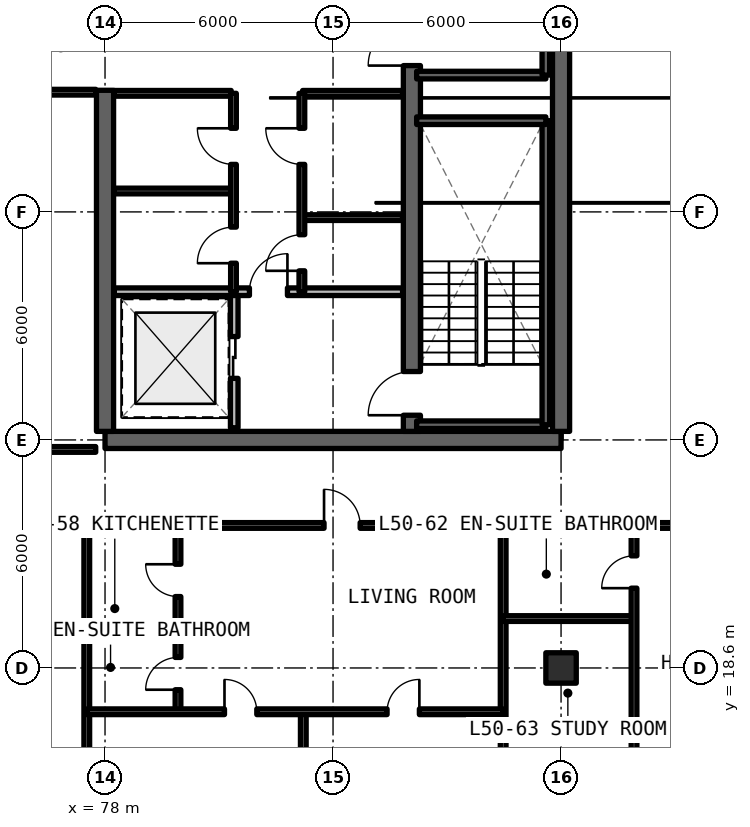
"""IFC4 building model, lengths in metres.
Left out: names, types, materials, properties, quantities, classifications, styles, units other than length and angle.
Written with IfcOpenShell. Run it as: python <this file> out.ifc"""

import sys

from ifc_helpers import new_model, si_unit, direction, frame, frame_2d, origin, origin_2d, place, context, subcontext, project, spatial, rectangle, extrude, element, fill, save


model = new_model("IFC4")
c1 = context("Model", 3, precision=1e-05, world=origin(), true_north=direction((0.0, 1.0)))
c2 = subcontext(c1, "Body", "Model", "MODEL_VIEW")
j1 = project(units=[si_unit("LENGTHUNIT", "METRE"), si_unit("PLANEANGLEUNIT", "RADIAN")], contexts=[c1])
p1 = place(None, origin())
s1 = spatial("IfcSite", under=j1, at=p1, CompositionType="ELEMENT")
p2 = place(p1, origin())
s2 = spatial("IfcBuilding", under=s1, at=p2, CompositionType="ELEMENT")
p3 = place(p2, frame((0.0, 0.0, 181.83)))
s3 = spatial("IfcBuildingStorey", under=s2, at=p3, CompositionType="ELEMENT", Elevation=181.83)
p4 = place(p3, frame((78.0, 24.6, 0.0), z_axis=(0.0, 0.0, 1.0), x_axis=(1.0, 0.0, 0.0)))
e1 = element("IfcWall", 1, at=p4, inside=s3, PredefinedType="SHEAR", context=c2, shape_type="SweptSolid", body=[
    extrude(rectangle(XDim=12.0, YDim=0.45, at=frame_2d((6.0, 0.0))), origin(), (0.0, 0.0, 1.0), 3.3),
])
p5 = place(p3, frame((90.0, 24.825, 0.0), z_axis=(0.0, 0.0, 1.0), x_axis=(0.0, 1.0, 0.0)))
e2 = element("IfcWall", 2, at=p5, inside=s3, PredefinedType="SHEAR", context=c2, shape_type="SweptSolid", body=[
    extrude(rectangle(XDim=17.55, YDim=0.45, at=frame_2d((8.775, 0.0))), origin(), (0.0, 0.0, 1.0), 3.3),
])
p6 = place(p3, frame((78.0, 24.825, 0.0), z_axis=(0.0, 0.0, 1.0), x_axis=(0.0, 1.0, 0.0)))
e3 = element("IfcWall", 3, at=p6, inside=s3, PredefinedType="SHEAR", context=c2, shape_type="SweptSolid", body=[
    extrude(rectangle(XDim=8.975, YDim=0.45, at=frame_2d((4.488, 0.0))), origin(), (0.0, 0.0, 1.0), 3.3),
])
p7 = place(p3, frame((86.075, 24.825, 0.0), z_axis=(0.0, 0.0, 1.0), x_axis=(0.0, 1.0, 0.0)))
e4 = element("IfcWall", 4, at=p7, inside=s3, PredefinedType="SHEAR", context=c2, shape_type="SweptSolid", body=[
    extrude(rectangle(XDim=17.55, YDim=0.45, at=frame_2d((8.775, 0.0))), origin(), (0.0, 0.0, 1.0), 3.3),
])
p8 = place(p7, frame((0.425, 0.0, 0.0)))
e5 = element("IfcOpeningElement", 5, at=p8, cuts=e4, PredefinedType="OPENING", context=c2, shape_type="SweptSolid", body=[
    extrude(rectangle(XDim=1.15, YDim=2.15, at=frame_2d((0.575, 1.075))), frame((0.0, 0.235, 0.0), z_axis=(0.0, -1.0, 0.0), x_axis=(1.0, 0.0, 0.0)), (0.0, 0.0, 1.0), 0.47),
])
p9 = place(p7, frame((9.625, 0.0, 0.0)))
e6 = element("IfcOpeningElement", 6, at=p9, cuts=e4, PredefinedType="OPENING", context=c2, shape_type="SweptSolid", body=[
    extrude(rectangle(XDim=1.15, YDim=2.15, at=frame_2d((0.575, 1.075))), frame((0.0, 0.235, 0.0), z_axis=(0.0, -1.0, 0.0), x_axis=(1.0, 0.0, 0.0)), (0.0, 0.0, 1.0), 0.47),
])
p10 = place(p3, frame((90.0, 18.6, 0.0), z_axis=(0.0, 0.0, 1.0), x_axis=(1.0, 0.0, 0.0)))
e7 = element("IfcColumn", 7, at=p10, inside=s3, PredefinedType="COLUMN", context=c2, shape_type="SweptSolid", body=[
    extrude(rectangle(XDim=0.8, YDim=0.8, at=origin_2d()), origin(), (0.0, 0.0, 1.0), 3.3),
])
p11 = place(p3, frame((81.4, 24.92, 0.0), z_axis=(0.0, 0.0, 1.0), x_axis=(0.0, 1.0, 0.0)))
e8 = element("IfcWall", 8, at=p11, inside=s3, PredefinedType="SOLIDWALL", context=c2, shape_type="SweptSolid", body=[
    extrude(rectangle(XDim=3.58, YDim=0.2, at=frame_2d((1.79, 0.0))), origin(), (0.0, 0.0, 1.0), 2.35),
])
p12 = place(p11, frame((1.3, 0.0, 0.0)))
e9 = element("IfcOpeningElement", 9, at=p12, cuts=e8, PredefinedType="OPENING", context=c2, shape_type="SweptSolid", body=[
    extrude(rectangle(XDim=1.1, YDim=2.2, at=frame_2d((0.55, 1.1))), frame((0.0, 0.11, 0.0), z_axis=(0.0, -1.0, 0.0), x_axis=(1.0, 0.0, 0.0)), (0.0, 0.0, 1.0), 0.22),
])
p13 = place(p3, frame((78.245, 28.5, 0.0), z_axis=(0.0, 0.0, 1.0), x_axis=(1.0, 0.0, 0.0)))
e10 = element("IfcWall", 10, at=p13, inside=s3, PredefinedType="SOLIDWALL", context=c2, shape_type="SweptSolid", body=[
    extrude(rectangle(XDim=7.585, YDim=0.2, at=frame_2d((3.792, 0.0))), origin(), (0.0, 0.0, 1.0), 2.35),
])
p14 = place(p13, frame((3.555, 0.0, 0.0)))
e11 = element("IfcOpeningElement", 11, at=p14, cuts=e10, PredefinedType="OPENING", context=c2, shape_type="SweptSolid", body=[
    extrude(rectangle(XDim=1.0, YDim=2.15, at=frame_2d((0.5, 1.075))), frame((0.0, 0.11, 0.0), z_axis=(0.0, -1.0, 0.0), x_axis=(1.0, 0.0, 0.0)), (0.0, 0.0, 1.0), 0.22),
])
for number, where, z_axis, x_axis in (
    (12, (83.2, 30.45, 0.0), (0.0, 0.0, 1.0), (1.0, 0.0, 0.0)),
    (13, (83.2, 33.72, 0.0), (0.0, 0.0, 1.0), (1.0, 0.0, 0.0)),
):
    element("IfcWall", number, at=place(p3, frame(where, z_axis=z_axis, x_axis=x_axis)), inside=s3, PredefinedType="SOLIDWALL", context=c2, shape_type="SweptSolid", body=[
        extrude(rectangle(XDim=2.63, YDim=0.15, at=frame_2d((1.315, 0.0))), origin(), (0.0, 0.0, 1.0), 2.35),
    ])
p15 = place(p3, frame((83.18, 28.5, 0.0), z_axis=(0.0, 0.0, 1.0), x_axis=(0.0, 1.0, 0.0)))
e14 = element("IfcWall", 14, at=p15, inside=s3, PredefinedType="SOLIDWALL", context=c2, shape_type="SweptSolid", body=[
    extrude(rectangle(XDim=5.22, YDim=0.15, at=frame_2d((2.61, 0.0))), origin(), (0.0, 0.0, 1.0), 2.35),
])
p16 = place(p15, frame((0.55, 0.0, 0.0)))
e15 = element("IfcOpeningElement", 15, at=p16, cuts=e14, PredefinedType="OPENING", context=c2, shape_type="SweptSolid", body=[
    extrude(rectangle(XDim=0.95, YDim=2.15, at=frame_2d((0.475, 1.075))), frame((0.0, 0.085, 0.0), z_axis=(0.0, -1.0, 0.0), x_axis=(1.0, 0.0, 0.0)), (0.0, 0.0, 1.0), 0.17),
])
p17 = place(p15, frame((3.35, 0.0, 0.0)))
e16 = element("IfcOpeningElement", 16, at=p17, cuts=e14, PredefinedType="OPENING", context=c2, shape_type="SweptSolid", body=[
    extrude(rectangle(XDim=0.95, YDim=2.15, at=frame_2d((0.475, 1.075))), frame((0.0, 0.085, 0.0), z_axis=(0.0, -1.0, 0.0), x_axis=(1.0, 0.0, 0.0)), (0.0, 0.0, 1.0), 0.17),
])
for number, where, z_axis, x_axis in (
    (17, (78.245, 31.15, 0.0), (0.0, 0.0, 1.0), (1.0, 0.0, 0.0)),
    (18, (78.245, 33.72, 0.0), (0.0, 0.0, 1.0), (1.0, 0.0, 0.0)),
):
    element("IfcWall", number, at=place(p3, frame(where, z_axis=z_axis, x_axis=x_axis)), inside=s3, PredefinedType="SOLIDWALL", context=c2, shape_type="SweptSolid", body=[
        extrude(rectangle(XDim=3.075, YDim=0.15, at=frame_2d((1.538, 0.0))), origin(), (0.0, 0.0, 1.0), 2.35),
    ])
p18 = place(p3, frame((81.38, 28.5, 0.0), z_axis=(0.0, 0.0, 1.0), x_axis=(0.0, 1.0, 0.0)))
e19 = element("IfcWall", 19, at=p18, inside=s3, PredefinedType="SOLIDWALL", context=c2, shape_type="SweptSolid", body=[
    extrude(rectangle(XDim=5.22, YDim=0.15, at=frame_2d((2.61, 0.0))), origin(), (0.0, 0.0, 1.0), 2.35),
])
p19 = place(p18, frame((0.75, 0.0, 0.0)))
e20 = element("IfcOpeningElement", 20, at=p19, cuts=e19, PredefinedType="OPENING", context=c2, shape_type="SweptSolid", body=[
    extrude(rectangle(XDim=0.95, YDim=2.15, at=frame_2d((0.475, 1.075))), frame((0.0, 0.085, 0.0), z_axis=(0.0, -1.0, 0.0), x_axis=(1.0, 0.0, 0.0)), (0.0, 0.0, 1.0), 0.17),
])
p20 = place(p18, frame((3.35, 0.0, 0.0)))
e21 = element("IfcOpeningElement", 21, at=p20, cuts=e19, PredefinedType="OPENING", context=c2, shape_type="SweptSolid", body=[
    extrude(rectangle(XDim=0.95, YDim=2.15, at=frame_2d((0.475, 1.075))), frame((0.0, 0.085, 0.0), z_axis=(0.0, -1.0, 0.0), x_axis=(1.0, 0.0, 0.0)), (0.0, 0.0, 1.0), 0.17),
])
p21 = place(p3, frame((69.85, 24.35, 0.0), z_axis=(0.0, 0.0, 1.0), x_axis=(1.0, 0.0, 0.0)))
e22 = element("IfcWall", 22, at=p21, inside=s3, PredefinedType="SOLIDWALL", context=c2, shape_type="SweptSolid", body=[
    extrude(rectangle(XDim=7.905, YDim=0.15, at=frame_2d((3.952, 0.0))), origin(), (0.0, 0.0, 1.0), 2.35),
])
p22 = place(p3, frame((69.85, 33.75, 0.0), z_axis=(0.0, 0.0, 1.0), x_axis=(1.0, 0.0, 0.0)))
e23 = element("IfcWall", 23, at=p22, inside=s3, PredefinedType="SOLIDWALL", context=c2, shape_type="SweptSolid", body=[
    extrude(rectangle(XDim=7.905, YDim=0.15, at=frame_2d((3.952, 0.0))), origin(), (0.0, 0.0, 1.0), 2.35),
])
p23 = place(p22, frame((3.478, 0.0, 0.0)))
e24 = element("IfcOpeningElement", 24, at=p23, cuts=e23, PredefinedType="OPENING", context=c2, shape_type="SweptSolid", body=[
    extrude(rectangle(XDim=0.95, YDim=2.15, at=frame_2d((0.475, 1.075))), frame((0.0, 0.085, 0.0), z_axis=(0.0, -1.0, 0.0), x_axis=(1.0, 0.0, 0.0)), (0.0, 0.0, 1.0), 0.17),
])
p24 = place(p3, frame((77.52, 12.27, 0.0), z_axis=(0.0, 0.0, 1.0), x_axis=(0.0, 1.0, 0.0)))
e25 = element("IfcWall", 25, at=p24, inside=s3, PredefinedType="SOLIDWALL", context=c2, shape_type="SweptSolid", body=[
    extrude(rectangle(XDim=10.08, YDim=0.15, at=frame_2d((5.04, 0.0))), origin(), (0.0, 0.0, 1.0), 2.35),
])
p25 = place(p3, frame((69.053, 22.35, 0.0), z_axis=(0.0, 0.0, 1.0), x_axis=(1.0, 0.0, 0.0)))
e26 = element("IfcWall", 26, at=p25, inside=s3, PredefinedType="SOLIDWALL", context=c2, shape_type="SweptSolid", body=[
    extrude(rectangle(XDim=8.467, YDim=0.15, at=frame_2d((4.233, 0.0))), origin(), (0.0, 0.0, 1.0), 2.35),
])
p26 = place(p25, frame((3.683, 0.0, 0.0)))
e27 = element("IfcOpeningElement", 27, at=p26, cuts=e26, PredefinedType="OPENING", context=c2, shape_type="SweptSolid", body=[
    extrude(rectangle(XDim=1.1, YDim=2.15, at=frame_2d((0.55, 1.075))), frame((0.0, 0.085, 0.0), z_axis=(0.0, -1.0, 0.0), x_axis=(1.0, 0.0, 0.0)), (0.0, 0.0, 1.0), 0.17),
])
p27 = place(p3, frame((88.477, 12.27, 0.0), z_axis=(0.0, 0.0, 1.0), x_axis=(0.0, 1.0, 0.0)))
e28 = element("IfcWall", 28, at=p27, inside=s3, PredefinedType="SOLIDWALL", context=c2, shape_type="SweptSolid", body=[
    extrude(rectangle(XDim=10.08, YDim=0.15, at=frame_2d((5.04, 0.0))), origin(), (0.0, 0.0, 1.0), 2.35),
])
p28 = place(p3, frame((77.52, 19.458, 0.0), z_axis=(0.0, 0.0, 1.0), x_axis=(1.0, 0.0, 0.0)))
e29 = element("IfcWall", 29, at=p28, inside=s3, PredefinedType="PARTITIONING", context=c2, shape_type="SweptSolid", body=[
    extrude(rectangle(XDim=2.4, YDim=0.15, at=frame_2d((1.2, 0.0))), origin(), (0.0, 0.0, 1.0), 2.35),
])
p29 = place(p3, frame((79.92, 17.448, 0.0), z_axis=(0.0, 0.0, 1.0), x_axis=(0.0, 1.0, 0.0)))
e30 = element("IfcWall", 30, at=p29, inside=s3, PredefinedType="PARTITIONING", context=c2, shape_type="SweptSolid", body=[
    extrude(rectangle(XDim=4.902, YDim=0.15, at=frame_2d((2.451, 0.0))), origin(), (0.0, 0.0, 1.0), 2.35),
])
p30 = place(p29, frame((0.58, 0.0, 0.0)))
e31 = element("IfcOpeningElement", 31, at=p30, cuts=e30, PredefinedType="OPENING", context=c2, shape_type="SweptSolid", body=[
    extrude(rectangle(XDim=0.85, YDim=2.1, at=frame_2d((0.425, 1.05))), frame((0.0, 0.085, 0.0), z_axis=(0.0, -1.0, 0.0), x_axis=(1.0, 0.0, 0.0)), (0.0, 0.0, 1.0), 0.17),
])
p31 = place(p29, frame((3.031, 0.0, 0.0)))
e32 = element("IfcOpeningElement", 32, at=p31, cuts=e30, PredefinedType="OPENING", context=c2, shape_type="SweptSolid", body=[
    extrude(rectangle(XDim=0.85, YDim=2.1, at=frame_2d((0.425, 1.05))), frame((0.0, 0.085, 0.0), z_axis=(0.0, -1.0, 0.0), x_axis=(1.0, 0.0, 0.0)), (0.0, 0.0, 1.0), 0.17),
])
p32 = place(p3, frame((83.217, 12.27, 0.0), z_axis=(0.0, 0.0, 1.0), x_axis=(0.0, 1.0, 0.0)))
e33 = element("IfcWall", 33, at=p32, inside=s3, PredefinedType="PARTITIONING", context=c2, shape_type="SweptSolid", body=[
    extrude(rectangle(XDim=5.178, YDim=0.15, at=frame_2d((2.589, 0.0))), origin(), (0.0, 0.0, 1.0), 2.35),
])
p33 = place(p3, frame((77.52, 17.448, 0.0), z_axis=(0.0, 0.0, 1.0), x_axis=(1.0, 0.0, 0.0)))
e34 = element("IfcWall", 34, at=p33, inside=s3, PredefinedType="PARTITIONING", context=c2, shape_type="SweptSolid", body=[
    extrude(rectangle(XDim=10.957, YDim=0.15, at=frame_2d((5.479, 0.0))), origin(), (0.0, 0.0, 1.0), 2.35),
])
p34 = place(p33, frame((3.624, 0.0, 0.0)))
e35 = element("IfcOpeningElement", 35, at=p34, cuts=e34, PredefinedType="OPENING", context=c2, shape_type="SweptSolid", body=[
    extrude(rectangle(XDim=0.85, YDim=2.1, at=frame_2d((0.425, 1.05))), frame((0.0, 0.085, 0.0), z_axis=(0.0, -1.0, 0.0), x_axis=(1.0, 0.0, 0.0)), (0.0, 0.0, 1.0), 0.17),
])
p35 = place(p33, frame((7.902, 0.0, 0.0)))
e36 = element("IfcOpeningElement", 36, at=p35, cuts=e34, PredefinedType="OPENING", context=c2, shape_type="SweptSolid", body=[
    extrude(rectangle(XDim=0.85, YDim=2.1, at=frame_2d((0.425, 1.05))), frame((0.0, 0.085, 0.0), z_axis=(0.0, -1.0, 0.0), x_axis=(1.0, 0.0, 0.0)), (0.0, 0.0, 1.0), 0.17),
])
p36 = place(p3, frame((77.52, 22.35, 0.0), z_axis=(0.0, 0.0, 1.0), x_axis=(1.0, 0.0, 0.0)))
e37 = element("IfcWall", 37, at=p36, inside=s3, PredefinedType="SOLIDWALL", context=c2, shape_type="SweptSolid", body=[
    extrude(rectangle(XDim=10.957, YDim=0.15, at=frame_2d((5.479, 0.0))), origin(), (0.0, 0.0, 1.0), 2.35),
])
p37 = place(p36, frame((6.243, 0.0, 0.0)))
e38 = element("IfcOpeningElement", 38, at=p37, cuts=e37, PredefinedType="OPENING", context=c2, shape_type="SweptSolid", body=[
    extrude(rectangle(XDim=0.95, YDim=2.15, at=frame_2d((0.475, 1.075))), frame((0.0, 0.085, 0.0), z_axis=(0.0, -1.0, 0.0), x_axis=(1.0, 0.0, 0.0)), (0.0, 0.0, 1.0), 0.17),
])
p38 = place(p3, frame((88.477, 19.9, 0.0), z_axis=(0.0, 0.0, 1.0), x_axis=(1.0, 0.0, 0.0)))
e39 = element("IfcWall", 39, at=p38, inside=s3, PredefinedType="PARTITIONING", context=c2, shape_type="SweptSolid", body=[
    extrude(rectangle(XDim=3.443, YDim=0.15, at=frame_2d((1.722, 0.0))), origin(), (0.0, 0.0, 1.0), 2.35),
])
p39 = place(p3, frame((91.92, 12.27, 0.0), z_axis=(0.0, 0.0, 1.0), x_axis=(0.0, 1.0, 0.0)))
e40 = element("IfcWall", 40, at=p39, inside=s3, PredefinedType="PARTITIONING", context=c2, shape_type="SweptSolid", body=[
    extrude(rectangle(XDim=10.08, YDim=0.15, at=frame_2d((5.04, 0.0))), origin(), (0.0, 0.0, 1.0), 2.35),
])
p40 = place(p39, frame((2.912, 0.0, 0.0)))
e41 = element("IfcOpeningElement", 41, at=p40, cuts=e40, PredefinedType="OPENING", context=c2, shape_type="SweptSolid", body=[
    extrude(rectangle(XDim=0.85, YDim=2.1, at=frame_2d((0.425, 1.05))), frame((0.0, 0.085, 0.0), z_axis=(0.0, -1.0, 0.0), x_axis=(1.0, 0.0, 0.0)), (0.0, 0.0, 1.0), 0.17),
])
p41 = place(p39, frame((8.43, 0.0, 0.0)))
e42 = element("IfcOpeningElement", 42, at=p41, cuts=e40, PredefinedType="OPENING", context=c2, shape_type="SweptSolid", body=[
    extrude(rectangle(XDim=0.85, YDim=2.1, at=frame_2d((0.425, 1.05))), frame((0.0, 0.085, 0.0), z_axis=(0.0, -1.0, 0.0), x_axis=(1.0, 0.0, 0.0)), (0.0, 0.0, 1.0), 0.17),
])
p42 = place(p3, frame((88.477, 22.35, 0.0), z_axis=(0.0, 0.0, 1.0), x_axis=(1.0, 0.0, 0.0)))
e43 = element("IfcWall", 43, at=p42, inside=s3, PredefinedType="SOLIDWALL", context=c2, shape_type="SweptSolid", body=[
    extrude(rectangle(XDim=6.723, YDim=0.15, at=frame_2d((3.362, 0.0))), origin(), (0.0, 0.0, 1.0), 2.35),
])
p43 = place(p42, frame((4.648, 0.0, 0.0)))
e44 = element("IfcOpeningElement", 44, at=p43, cuts=e43, PredefinedType="OPENING", context=c2, shape_type="SweptSolid", body=[
    extrude(rectangle(XDim=0.95, YDim=2.15, at=frame_2d((0.475, 1.075))), frame((0.0, 0.085, 0.0), z_axis=(0.0, -1.0, 0.0), x_axis=(1.0, 0.0, 0.0)), (0.0, 0.0, 1.0), 0.17),
])
p44 = place(p3, frame((86.2, 25.0, 0.0), z_axis=(0.0, 0.0, 1.0), x_axis=(1.0, 0.0, 0.0)))
e45 = element("IfcWall", 45, at=p44, inside=s3, PredefinedType="SOLIDWALL", context=c2, shape_type="SweptSolid", body=[
    extrude(rectangle(XDim=3.4, YDim=0.2, at=frame_2d((1.7, 0.0))), origin(), (0.0, 0.0, 1.0), 3.3),
])
p45 = place(p3, frame((89.6, 25.0, 0.0), z_axis=(0.0, 0.0, 1.0), x_axis=(0.0, 1.0, 0.0)))
e46 = element("IfcWall", 46, at=p45, inside=s3, PredefinedType="SOLIDWALL", context=c2, shape_type="SweptSolid", body=[
    extrude(rectangle(XDim=8.0, YDim=0.2, at=frame_2d((4.0, 0.0))), origin(), (0.0, 0.0, 1.0), 3.3),
])
for number, where, z_axis, x_axis in (
    (47, (89.6, 33.0, 0.0), (0.0, 0.0, 1.0), (-1.0, 0.0, 0.0)),
    (48, (86.2, 34.2, 0.0), (0.0, 0.0, 1.0), (1.0, 0.0, 0.0)),
):
    element("IfcWall", number, at=place(p3, frame(where, z_axis=z_axis, x_axis=x_axis)), inside=s3, PredefinedType="SOLIDWALL", context=c2, shape_type="SweptSolid", body=[
        extrude(rectangle(XDim=3.4, YDim=0.2, at=frame_2d((1.7, 0.0))), origin(), (0.0, 0.0, 1.0), 3.3),
    ])
p46 = place(p3, frame((89.6, 34.2, 0.0), z_axis=(0.0, 0.0, 1.0), x_axis=(0.0, 1.0, 0.0)))
e49 = element("IfcWall", 49, at=p46, inside=s3, PredefinedType="SOLIDWALL", context=c2, shape_type="SweptSolid", body=[
    extrude(rectangle(XDim=8.0, YDim=0.2, at=frame_2d((4.0, 0.0))), origin(), (0.0, 0.0, 1.0), 3.3),
])
p47 = place(p12, origin())
e50 = element("IfcDoor", 50, at=p47, inside=s3, OperationType="SLIDING_TO_LEFT", PredefinedType="DOOR", context=c2, shape_type="SweptSolid", body=[
    extrude(rectangle(XDim=1.1, YDim=2.2, at=frame_2d((0.55, 1.1))), frame((0.0, 0.025, 0.0), z_axis=(0.0, -1.0, 0.0), x_axis=(1.0, 0.0, 0.0)), (0.0, 0.0, 1.0), 0.05),
])
fill(e9, e50)
p48 = place(p14, origin())
e51 = element("IfcDoor", 51, at=p48, inside=s3, OperationType="SINGLE_SWING_RIGHT", PredefinedType="DOOR", context=c2, shape_type="SweptSolid", body=[
    extrude(rectangle(XDim=1.0, YDim=2.15, at=frame_2d((0.5, 1.075))), frame((0.0, 0.025, 0.0), z_axis=(0.0, -1.0, 0.0), x_axis=(1.0, 0.0, 0.0)), (0.0, 0.0, 1.0), 0.05),
])
fill(e11, e51)
p49 = place(p16, origin())
e52 = element("IfcDoor", 52, at=p49, inside=s3, OperationType="SINGLE_SWING_LEFT", PredefinedType="DOOR", context=c2, shape_type="SweptSolid", body=[
    extrude(rectangle(XDim=0.95, YDim=2.15, at=frame_2d((0.475, 1.075))), frame((0.0, 0.025, 0.0), z_axis=(0.0, -1.0, 0.0), x_axis=(1.0, 0.0, 0.0)), (0.0, 0.0, 1.0), 0.05),
])
fill(e15, e52)
p50 = place(p17, origin())
e53 = element("IfcDoor", 53, at=p50, inside=s3, OperationType="SINGLE_SWING_RIGHT", PredefinedType="DOOR", context=c2, shape_type="SweptSolid", body=[
    extrude(rectangle(XDim=0.95, YDim=2.15, at=frame_2d((0.475, 1.075))), frame((0.0, 0.025, 0.0), z_axis=(0.0, -1.0, 0.0), x_axis=(1.0, 0.0, 0.0)), (0.0, 0.0, 1.0), 0.05),
])
fill(e16, e53)
p51 = place(p19, origin())
e54 = element("IfcDoor", 54, at=p51, inside=s3, OperationType="SINGLE_SWING_LEFT", PredefinedType="DOOR", context=c2, shape_type="SweptSolid", body=[
    extrude(rectangle(XDim=0.95, YDim=2.15, at=frame_2d((0.475, 1.075))), frame((0.0, 0.025, 0.0), z_axis=(0.0, -1.0, 0.0), x_axis=(1.0, 0.0, 0.0)), (0.0, 0.0, 1.0), 0.05),
])
fill(e20, e54)
p52 = place(p20, origin())
e55 = element("IfcDoor", 55, at=p52, inside=s3, OperationType="SINGLE_SWING_RIGHT", PredefinedType="DOOR", context=c2, shape_type="SweptSolid", body=[
    extrude(rectangle(XDim=0.95, YDim=2.15, at=frame_2d((0.475, 1.075))), frame((0.0, 0.025, 0.0), z_axis=(0.0, -1.0, 0.0), x_axis=(1.0, 0.0, 0.0)), (0.0, 0.0, 1.0), 0.05),
])
fill(e21, e55)
p53 = place(p30, origin())
e56 = element("IfcDoor", 56, at=p53, inside=s3, OperationType="SINGLE_SWING_LEFT", PredefinedType="DOOR", context=c2, shape_type="SweptSolid", body=[
    extrude(rectangle(XDim=0.85, YDim=2.1, at=frame_2d((0.425, 1.05))), frame((0.0, 0.025, 0.0), z_axis=(0.0, -1.0, 0.0), x_axis=(1.0, 0.0, 0.0)), (0.0, 0.0, 1.0), 0.05),
])
fill(e31, e56)
p54 = place(p31, origin())
e57 = element("IfcDoor", 57, at=p54, inside=s3, OperationType="SINGLE_SWING_RIGHT", PredefinedType="DOOR", context=c2, shape_type="SweptSolid", body=[
    extrude(rectangle(XDim=0.85, YDim=2.1, at=frame_2d((0.425, 1.05))), frame((0.0, 0.025, 0.0), z_axis=(0.0, -1.0, 0.0), x_axis=(1.0, 0.0, 0.0)), (0.0, 0.0, 1.0), 0.05),
])
fill(e32, e57)
p55 = place(p34, origin())
e58 = element("IfcDoor", 58, at=p55, inside=s3, OperationType="SINGLE_SWING_LEFT", PredefinedType="DOOR", context=c2, shape_type="SweptSolid", body=[
    extrude(rectangle(XDim=0.85, YDim=2.1, at=frame_2d((0.425, 1.05))), frame((0.0, 0.025, 0.0), z_axis=(0.0, -1.0, 0.0), x_axis=(1.0, 0.0, 0.0)), (0.0, 0.0, 1.0), 0.05),
])
fill(e35, e58)
p56 = place(p35, origin())
e59 = element("IfcDoor", 59, at=p56, inside=s3, OperationType="SINGLE_SWING_RIGHT", PredefinedType="DOOR", context=c2, shape_type="SweptSolid", body=[
    extrude(rectangle(XDim=0.85, YDim=2.1, at=frame_2d((0.425, 1.05))), frame((0.0, 0.025, 0.0), z_axis=(0.0, -1.0, 0.0), x_axis=(1.0, 0.0, 0.0)), (0.0, 0.0, 1.0), 0.05),
])
fill(e36, e59)
p57 = place(p37, origin())
e60 = element("IfcDoor", 60, at=p57, inside=s3, OperationType="SINGLE_SWING_LEFT", PredefinedType="DOOR", context=c2, shape_type="SweptSolid", body=[
    extrude(rectangle(XDim=0.95, YDim=2.15, at=frame_2d((0.475, 1.075))), frame((0.0, 0.025, 0.0), z_axis=(0.0, -1.0, 0.0), x_axis=(1.0, 0.0, 0.0)), (0.0, 0.0, 1.0), 0.05),
])
fill(e38, e60)
p58 = place(p41, origin())
e61 = element("IfcDoor", 61, at=p58, inside=s3, OperationType="SINGLE_SWING_LEFT", PredefinedType="DOOR", context=c2, shape_type="SweptSolid", body=[
    extrude(rectangle(XDim=0.85, YDim=2.1, at=frame_2d((0.425, 1.05))), frame((0.0, 0.025, 0.0), z_axis=(0.0, -1.0, 0.0), x_axis=(1.0, 0.0, 0.0)), (0.0, 0.0, 1.0), 0.05),
])
fill(e42, e61)
p59 = place(p8, origin())
e62 = element("IfcDoor", 62, at=p59, inside=s3, OperationType="SINGLE_SWING_RIGHT", PredefinedType="DOOR", context=c2, shape_type="SweptSolid", body=[
    extrude(rectangle(XDim=1.15, YDim=2.15, at=frame_2d((0.575, 1.075))), frame((0.0, 0.025, 0.0), z_axis=(0.0, -1.0, 0.0), x_axis=(1.0, 0.0, 0.0)), (0.0, 0.0, 1.0), 0.05),
])
fill(e5, e62)
p60 = place(p9, origin())
e63 = element("IfcDoor", 63, at=p60, inside=s3, OperationType="SINGLE_SWING_LEFT", PredefinedType="DOOR", context=c2, shape_type="SweptSolid", body=[
    extrude(rectangle(XDim=1.15, YDim=2.15, at=frame_2d((0.575, 1.075))), frame((0.0, 0.025, 0.0), z_axis=(0.0, -1.0, 0.0), x_axis=(1.0, 0.0, 0.0)), (0.0, 0.0, 1.0), 0.05),
])
fill(e6, e63)
save(model, sys.argv[1])
